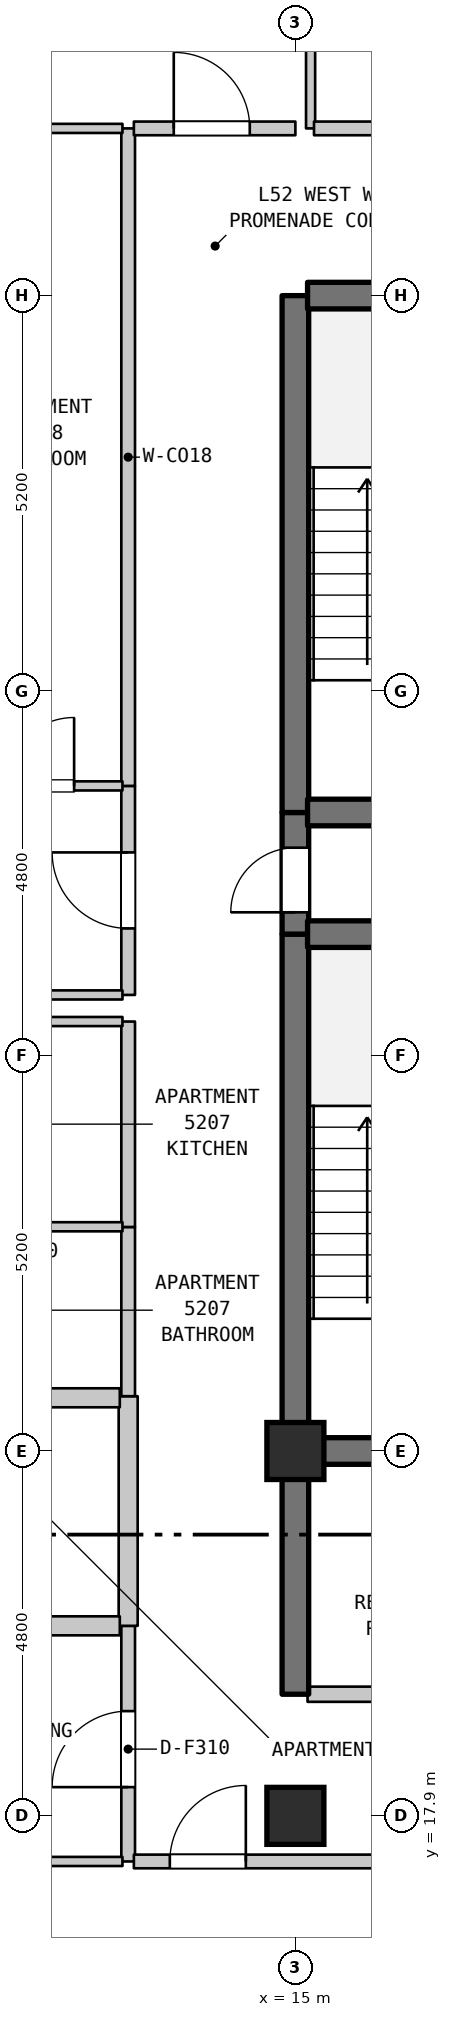
"""IFC4 building model, lengths in metres.
Left out: names, types, materials, properties, quantities, classifications, styles, units other than length and angle.
Written with IfcOpenShell. Run it as: python <this file> out.ifc"""

import sys

from ifc_helpers import new_model, si_unit, direction, frame, frame_2d, origin, origin_2d, place, context, subcontext, project, spatial, rectangle, extrude, element, fill, save


model = new_model("IFC4")
c1 = context("Model", 3, precision=1e-05, world=origin(), true_north=direction((0.0, 1.0)))
c2 = subcontext(c1, "Body", "Model", "MODEL_VIEW")
j1 = project(units=[si_unit("LENGTHUNIT", "METRE"), si_unit("PLANEANGLEUNIT", "RADIAN")], contexts=[c1])
p1 = place(None, origin())
s1 = spatial("IfcSite", under=j1, at=p1, CompositionType="ELEMENT")
p2 = place(p1, origin())
s2 = spatial("IfcBuilding", under=s1, at=p2, CompositionType="ELEMENT")
p3 = place(p2, frame((0.0, 0.0, 210.6)))
s3 = spatial("IfcBuildingStorey", under=s2, at=p3, CompositionType="ELEMENT", Elevation=210.6)
for number, where, z_axis, x_axis in (
    (1, (15.0, 17.9, 0.0), (0.0, 0.0, 1.0), (1.0, 0.0, 0.0)),
    (2, (15.0, 22.7, 0.0), (0.0, 0.0, 1.0), (1.0, 0.0, 0.0)),
):
    element("IfcColumn", number, at=place(p3, frame(where, z_axis=z_axis, x_axis=x_axis)), inside=s3, PredefinedType="COLUMN", context=c2, shape_type="SweptSolid", body=[
        extrude(rectangle(XDim=0.75, YDim=0.75, at=origin_2d()), origin(), (0.0, 0.0, 1.0), 3.7),
    ])
p4 = place(p3, frame((12.8, 17.3, 0.0), z_axis=(0.0, 0.0, 1.0), x_axis=(0.0, 1.0, 0.0)))
e3 = element("IfcWall", 3, at=p4, inside=s3, PredefinedType="STANDARD", context=c2, shape_type="SweptSolid", body=[
    extrude(rectangle(XDim=3.1, YDim=0.18, at=frame_2d((1.55, 0.0))), origin(), (0.0, 0.0, 1.0), 3.39),
])
p5 = place(p4, frame((0.978, 0.0, 0.0)))
e4 = element("IfcOpeningElement", 4, at=p5, cuts=e3, PredefinedType="OPENING", context=c2, shape_type="SweptSolid", body=[
    extrude(rectangle(XDim=1.0, YDim=2.15, at=frame_2d((0.5, 1.075))), frame((0.0, 0.1, 0.0), z_axis=(0.0, -1.0, 0.0), x_axis=(1.0, 0.0, 0.0)), (0.0, 0.0, 1.0), 0.2),
])
p6 = place(p3, frame((12.8, 20.4, 0.0), z_axis=(0.0, 0.0, 1.0), x_axis=(0.0, 1.0, 0.0)))
e5 = element("IfcWall", 5, at=p6, inside=s3, PredefinedType="STANDARD", context=c2, shape_type="SweptSolid", body=[
    extrude(rectangle(XDim=3.021, YDim=0.25, at=frame_2d((1.51, 0.0))), origin(), (0.0, 0.0, 1.0), 3.39),
])
p7 = place(p3, frame((12.8, 23.421, 0.0), z_axis=(0.0, 0.0, 1.0), x_axis=(0.0, 1.0, 0.0)))
e6 = element("IfcWall", 6, at=p7, inside=s3, PredefinedType="STANDARD", context=c2, shape_type="SweptSolid", body=[
    extrude(rectangle(XDim=2.226, YDim=0.18, at=frame_2d((1.113, 0.0))), origin(), (0.0, 0.0, 1.0), 3.39),
])
p8 = place(p3, frame((12.8, 25.647, 0.0), z_axis=(0.0, 0.0, 1.0), x_axis=(0.0, 1.0, 0.0)))
e7 = element("IfcWall", 7, at=p8, inside=s3, PredefinedType="STANDARD", context=c2, shape_type="SweptSolid", body=[
    extrude(rectangle(XDim=2.703, YDim=0.18, at=frame_2d((1.352, 0.0))), origin(), (0.0, 0.0, 1.0), 3.39),
])
p9 = place(p3, frame((12.8, 28.7, 0.0), z_axis=(0.0, 0.0, 1.0), x_axis=(0.0, 1.0, 0.0)))
e8 = element("IfcWall", 8, at=p9, inside=s3, PredefinedType="STANDARD", context=c2, shape_type="SweptSolid", body=[
    extrude(rectangle(XDim=2.75, YDim=0.18, at=frame_2d((1.375, 0.0))), origin(), (0.0, 0.0, 1.0), 3.39),
])
p10 = place(p9, frame((0.875, 0.0, 0.0)))
e9 = element("IfcOpeningElement", 9, at=p10, cuts=e8, PredefinedType="OPENING", context=c2, shape_type="SweptSolid", body=[
    extrude(rectangle(XDim=1.0, YDim=2.15, at=frame_2d((0.5, 1.075))), frame((0.0, 0.1, 0.0), z_axis=(0.0, -1.0, 0.0), x_axis=(1.0, 0.0, 0.0)), (0.0, 0.0, 1.0), 0.2),
])
p11 = place(p3, frame((12.8, 31.45, 0.0), z_axis=(0.0, 0.0, 1.0), x_axis=(0.0, 1.0, 0.0)))
e10 = element("IfcWall", 10, at=p11, inside=s3, PredefinedType="STANDARD", context=c2, shape_type="SweptSolid", body=[
    extrude(rectangle(XDim=8.65, YDim=0.18, at=frame_2d((4.325, 0.0))), origin(), (0.0, 0.0, 1.0), 3.39),
])
p12 = place(p3, frame((15.0, 19.5, 0.0), z_axis=(0.0, 0.0, 1.0), x_axis=(0.0, 1.0, 0.0)))
e11 = element("IfcWall", 11, at=p12, inside=s3, PredefinedType="SHEAR", context=c2, shape_type="SweptSolid", body=[
    extrude(rectangle(XDim=3.2, YDim=0.35, at=frame_2d((1.6, 0.0))), origin(), (0.0, 0.0, 1.0), 3.39),
])
p13 = place(p3, frame((15.0, 22.7, 0.0), z_axis=(0.0, 0.0, 1.0), x_axis=(0.0, 1.0, 0.0)))
e12 = element("IfcWall", 12, at=p13, inside=s3, PredefinedType="SHEAR", context=c2, shape_type="SweptSolid", body=[
    extrude(rectangle(XDim=6.8, YDim=0.35, at=frame_2d((3.4, 0.0))), origin(), (0.0, 0.0, 1.0), 3.39),
])
p14 = place(p3, frame((15.0, 29.5, 0.0), z_axis=(0.0, 0.0, 1.0), x_axis=(0.0, 1.0, 0.0)))
e13 = element("IfcWall", 13, at=p14, inside=s3, PredefinedType="SHEAR", context=c2, shape_type="SweptSolid", body=[
    extrude(rectangle(XDim=1.6, YDim=0.35, at=frame_2d((0.8, 0.0))), origin(), (0.0, 0.0, 1.0), 3.39),
])
p15 = place(p14, frame((0.287, 0.0, 0.0)))
e14 = element("IfcOpeningElement", 14, at=p15, cuts=e13, PredefinedType="OPENING", context=c2, shape_type="SweptSolid", body=[
    extrude(rectangle(XDim=0.85, YDim=2.1, at=frame_2d((0.425, 1.05))), frame((0.0, 0.185, 0.0), z_axis=(0.0, -1.0, 0.0), x_axis=(1.0, 0.0, 0.0)), (0.0, 0.0, 1.0), 0.37),
])
p16 = place(p3, frame((15.0, 31.1, 0.0), z_axis=(0.0, 0.0, 1.0), x_axis=(0.0, 1.0, 0.0)))
e15 = element("IfcWall", 15, at=p16, inside=s3, PredefinedType="SHEAR", context=c2, shape_type="SweptSolid", body=[
    extrude(rectangle(XDim=6.8, YDim=0.35, at=frame_2d((3.4, 0.0))), origin(), (0.0, 0.0, 1.0), 3.39),
])
p17 = place(p3, frame((15.2, 40.1, 0.0), z_axis=(0.0, 0.0, 1.0), x_axis=(0.0, 1.0, 0.0)))
e16 = element("IfcWall", 16, at=p17, inside=s3, PredefinedType="PARTITIONING", context=c2, shape_type="SweptSolid", body=[
    extrude(rectangle(XDim=3.2, YDim=0.12, at=frame_2d((1.6, 0.0))), origin(), (0.0, 0.0, 1.0), 3.39),
])
p18 = place(p3, frame((9.085, 17.3, 0.0), z_axis=(0.0, 0.0, 1.0), x_axis=(1.0, 0.0, 0.0)))
e17 = element("IfcWall", 17, at=p18, inside=s3, PredefinedType="PARTITIONING", context=c2, shape_type="SweptSolid", body=[
    extrude(rectangle(XDim=3.64, YDim=0.12, at=frame_2d((1.82, 0.0))), origin(), (0.0, 0.0, 1.0), 3.39),
])
p19 = place(p3, frame((12.875, 17.3, 0.0), z_axis=(0.0, 0.0, 1.0), x_axis=(1.0, 0.0, 0.0)))
e18 = element("IfcWall", 18, at=p19, inside=s3, PredefinedType="STANDARD", context=c2, shape_type="SweptSolid", body=[
    extrude(rectangle(XDim=3.58, YDim=0.18, at=frame_2d((1.79, 0.0))), origin(), (0.0, 0.0, 1.0), 3.39),
])
p20 = place(p19, frame((0.473, 0.0, 0.0)))
e19 = element("IfcOpeningElement", 19, at=p20, cuts=e18, PredefinedType="OPENING", context=c2, shape_type="SweptSolid", body=[
    extrude(rectangle(XDim=1.0, YDim=2.15, at=frame_2d((0.5, 1.075))), frame((0.0, 0.1, 0.0), z_axis=(0.0, -1.0, 0.0), x_axis=(1.0, 0.0, 0.0)), (0.0, 0.0, 1.0), 0.2),
])
p21 = place(p3, frame((15.16, 19.5, 0.0), z_axis=(0.0, 0.0, 1.0), x_axis=(1.0, 0.0, 0.0)))
e20 = element("IfcWall", 20, at=p21, inside=s3, PredefinedType="STANDARD", context=c2, shape_type="SweptSolid", body=[
    extrude(rectangle(XDim=3.68, YDim=0.2, at=frame_2d((1.84, 0.0))), origin(), (0.0, 0.0, 1.0), 3.39),
])
p22 = place(p21, frame((1.39, 0.0, 0.0)))
e21 = element("IfcOpeningElement", 21, at=p22, cuts=e20, PredefinedType="OPENING", context=c2, shape_type="SweptSolid", body=[
    extrude(rectangle(XDim=0.9, YDim=2.15, at=frame_2d((0.45, 1.075))), frame((0.0, 0.11, 0.0), z_axis=(0.0, -1.0, 0.0), x_axis=(1.0, 0.0, 0.0)), (0.0, 0.0, 1.0), 0.22),
])
p23 = place(p3, frame((10.66, 20.4, 0.0), z_axis=(0.0, 0.0, 1.0), x_axis=(1.0, 0.0, 0.0)))
e22 = element("IfcWall", 22, at=p23, inside=s3, PredefinedType="STANDARD", context=c2, shape_type="SweptSolid", body=[
    extrude(rectangle(XDim=2.03, YDim=0.25, at=frame_2d((1.015, 0.0))), origin(), (0.0, 0.0, 1.0), 3.39),
])
p24 = place(p3, frame((15.16, 22.7, 0.0), z_axis=(0.0, 0.0, 1.0), x_axis=(1.0, 0.0, 0.0)))
e23 = element("IfcWall", 23, at=p24, inside=s3, PredefinedType="SHEAR", context=c2, shape_type="SweptSolid", body=[
    extrude(rectangle(XDim=3.68, YDim=0.35, at=frame_2d((1.84, 0.0))), origin(), (0.0, 0.0, 1.0), 3.39),
])
p25 = place(p3, frame((10.66, 23.4, 0.0), z_axis=(0.0, 0.0, 1.0), x_axis=(1.0, 0.0, 0.0)))
e24 = element("IfcWall", 24, at=p25, inside=s3, PredefinedType="STANDARD", context=c2, shape_type="SweptSolid", body=[
    extrude(rectangle(XDim=2.03, YDim=0.25, at=frame_2d((1.015, 0.0))), origin(), (0.0, 0.0, 1.0), 3.39),
])
for number, where, z_axis, x_axis in (
    (25, (10.595, 25.65, 0.0), (0.0, 0.0, 1.0), (1.0, 0.0, 0.0)),
    (26, (10.595, 28.35, 0.0), (0.0, 0.0, 1.0), (1.0, 0.0, 0.0)),
):
    element("IfcWall", number, at=place(p3, frame(where, z_axis=z_axis, x_axis=x_axis)), inside=s3, PredefinedType="PARTITIONING", context=c2, shape_type="SweptSolid", body=[
        extrude(rectangle(XDim=2.13, YDim=0.12, at=frame_2d((1.065, 0.0))), origin(), (0.0, 0.0, 1.0), 3.39),
    ])
p26 = place(p3, frame((9.03, 28.7, 0.0), z_axis=(0.0, 0.0, 1.0), x_axis=(1.0, 0.0, 0.0)))
e27 = element("IfcWall", 27, at=p26, inside=s3, PredefinedType="PARTITIONING", context=c2, shape_type="SweptSolid", body=[
    extrude(rectangle(XDim=3.695, YDim=0.12, at=frame_2d((1.848, 0.0))), origin(), (0.0, 0.0, 1.0), 3.39),
])
for number, where, z_axis, x_axis in (
    (28, (15.16, 29.5, 0.0), (0.0, 0.0, 1.0), (1.0, 0.0, 0.0)),
    (29, (15.16, 31.1, 0.0), (0.0, 0.0, 1.0), (1.0, 0.0, 0.0)),
):
    element("IfcWall", number, at=place(p3, frame(where, z_axis=z_axis, x_axis=x_axis)), inside=s3, PredefinedType="SHEAR", context=c2, shape_type="SweptSolid", body=[
        extrude(rectangle(XDim=3.68, YDim=0.35, at=frame_2d((1.84, 0.0))), origin(), (0.0, 0.0, 1.0), 3.39),
    ])
p27 = place(p3, frame((10.523, 31.45, 0.0), z_axis=(0.0, 0.0, 1.0), x_axis=(1.0, 0.0, 0.0)))
e30 = element("IfcWall", 30, at=p27, inside=s3, PredefinedType="PARTITIONING", context=c2, shape_type="SweptSolid", body=[
    extrude(rectangle(XDim=2.202, YDim=0.12, at=frame_2d((1.101, 0.0))), origin(), (0.0, 0.0, 1.0), 3.39),
])
p28 = place(p27, frame((0.666, 0.0, 0.0)))
e31 = element("IfcOpeningElement", 31, at=p28, cuts=e30, PredefinedType="OPENING", context=c2, shape_type="SweptSolid", body=[
    extrude(rectangle(XDim=0.9, YDim=2.1, at=frame_2d((0.45, 1.05))), frame((0.0, 0.07, 0.0), z_axis=(0.0, -1.0, 0.0), x_axis=(1.0, 0.0, 0.0)), (0.0, 0.0, 1.0), 0.14),
])
p29 = place(p3, frame((15.16, 37.9, 0.0), z_axis=(0.0, 0.0, 1.0), x_axis=(1.0, 0.0, 0.0)))
e32 = element("IfcWall", 32, at=p29, inside=s3, PredefinedType="SHEAR", context=c2, shape_type="SweptSolid", body=[
    extrude(rectangle(XDim=3.68, YDim=0.35, at=frame_2d((1.84, 0.0))), origin(), (0.0, 0.0, 1.0), 3.39),
])
p30 = place(p3, frame((10.523, 40.1, 0.0), z_axis=(0.0, 0.0, 1.0), x_axis=(1.0, 0.0, 0.0)))
e33 = element("IfcWall", 33, at=p30, inside=s3, PredefinedType="PARTITIONING", context=c2, shape_type="SweptSolid", body=[
    extrude(rectangle(XDim=2.202, YDim=0.12, at=frame_2d((1.101, 0.0))), origin(), (0.0, 0.0, 1.0), 3.39),
])
p31 = place(p3, frame((12.875, 40.1, 0.0), z_axis=(0.0, 0.0, 1.0), x_axis=(1.0, 0.0, 0.0)))
e34 = element("IfcWall", 34, at=p31, inside=s3, PredefinedType="STANDARD", context=c2, shape_type="SweptSolid", body=[
    extrude(rectangle(XDim=2.125, YDim=0.18, at=frame_2d((1.062, 0.0))), origin(), (0.0, 0.0, 1.0), 3.39),
])
p32 = place(p31, frame((0.525, 0.0, 0.0)))
e35 = element("IfcOpeningElement", 35, at=p32, cuts=e34, PredefinedType="OPENING", context=c2, shape_type="SweptSolid", body=[
    extrude(rectangle(XDim=1.0, YDim=2.15, at=frame_2d((0.5, 1.075))), frame((0.0, 0.1, 0.0), z_axis=(0.0, -1.0, 0.0), x_axis=(1.0, 0.0, 0.0)), (0.0, 0.0, 1.0), 0.2),
])
p33 = place(p3, frame((15.245, 40.1, 0.0), z_axis=(0.0, 0.0, 1.0), x_axis=(1.0, 0.0, 0.0)))
e36 = element("IfcWall", 36, at=p33, inside=s3, PredefinedType="STANDARD", context=c2, shape_type="SweptSolid", body=[
    extrude(rectangle(XDim=2.26, YDim=0.18, at=frame_2d((1.13, 0.0))), origin(), (0.0, 0.0, 1.0), 3.39),
])
p34 = place(p5, origin())
e37 = element("IfcDoor", 37, at=p34, inside=s3, OperationType="SINGLE_SWING_LEFT", PredefinedType="DOOR", context=c2, shape_type="SweptSolid", body=[
    extrude(rectangle(XDim=1.0, YDim=2.15, at=frame_2d((0.5, 1.075))), frame((0.0, 0.025, 0.0), z_axis=(0.0, -1.0, 0.0), x_axis=(1.0, 0.0, 0.0)), (0.0, 0.0, 1.0), 0.05),
])
fill(e4, e37)
p35 = place(p10, origin())
e38 = element("IfcDoor", 38, at=p35, inside=s3, OperationType="SINGLE_SWING_RIGHT", PredefinedType="DOOR", context=c2, shape_type="SweptSolid", body=[
    extrude(rectangle(XDim=1.0, YDim=2.15, at=frame_2d((0.5, 1.075))), frame((0.0, 0.025, 0.0), z_axis=(0.0, -1.0, 0.0), x_axis=(1.0, 0.0, 0.0)), (0.0, 0.0, 1.0), 0.05),
])
fill(e9, e38)
p36 = place(p15, origin())
e39 = element("IfcDoor", 39, at=p36, inside=s3, OperationType="SINGLE_SWING_LEFT", PredefinedType="DOOR", context=c2, shape_type="SweptSolid", body=[
    extrude(rectangle(XDim=0.85, YDim=2.1, at=frame_2d((0.425, 1.05))), frame((0.0, 0.025, 0.0), z_axis=(0.0, -1.0, 0.0), x_axis=(1.0, 0.0, 0.0)), (0.0, 0.0, 1.0), 0.05),
])
fill(e14, e39)
p37 = place(p20, origin())
e40 = element("IfcDoor", 40, at=p37, inside=s3, OperationType="SINGLE_SWING_RIGHT", PredefinedType="DOOR", context=c2, shape_type="SweptSolid", body=[
    extrude(rectangle(XDim=1.0, YDim=2.15, at=frame_2d((0.5, 1.075))), frame((0.0, 0.025, 0.0), z_axis=(0.0, -1.0, 0.0), x_axis=(1.0, 0.0, 0.0)), (0.0, 0.0, 1.0), 0.05),
])
fill(e19, e40)
p38 = place(p28, origin())
e41 = element("IfcDoor", 41, at=p38, inside=s3, OperationType="SINGLE_SWING_RIGHT", PredefinedType="DOOR", context=c2, shape_type="SweptSolid", body=[
    extrude(rectangle(XDim=0.9, YDim=2.1, at=frame_2d((0.45, 1.05))), frame((0.0, 0.025, 0.0), z_axis=(0.0, -1.0, 0.0), x_axis=(1.0, 0.0, 0.0)), (0.0, 0.0, 1.0), 0.05),
])
fill(e31, e41)
p39 = place(p32, origin())
e42 = element("IfcDoor", 42, at=p39, inside=s3, OperationType="SINGLE_SWING_LEFT", PredefinedType="DOOR", context=c2, shape_type="SweptSolid", body=[
    extrude(rectangle(XDim=1.0, YDim=2.15, at=frame_2d((0.5, 1.075))), frame((0.0, 0.025, 0.0), z_axis=(0.0, -1.0, 0.0), x_axis=(1.0, 0.0, 0.0)), (0.0, 0.0, 1.0), 0.05),
])
fill(e35, e42)
save(model, sys.argv[1])
